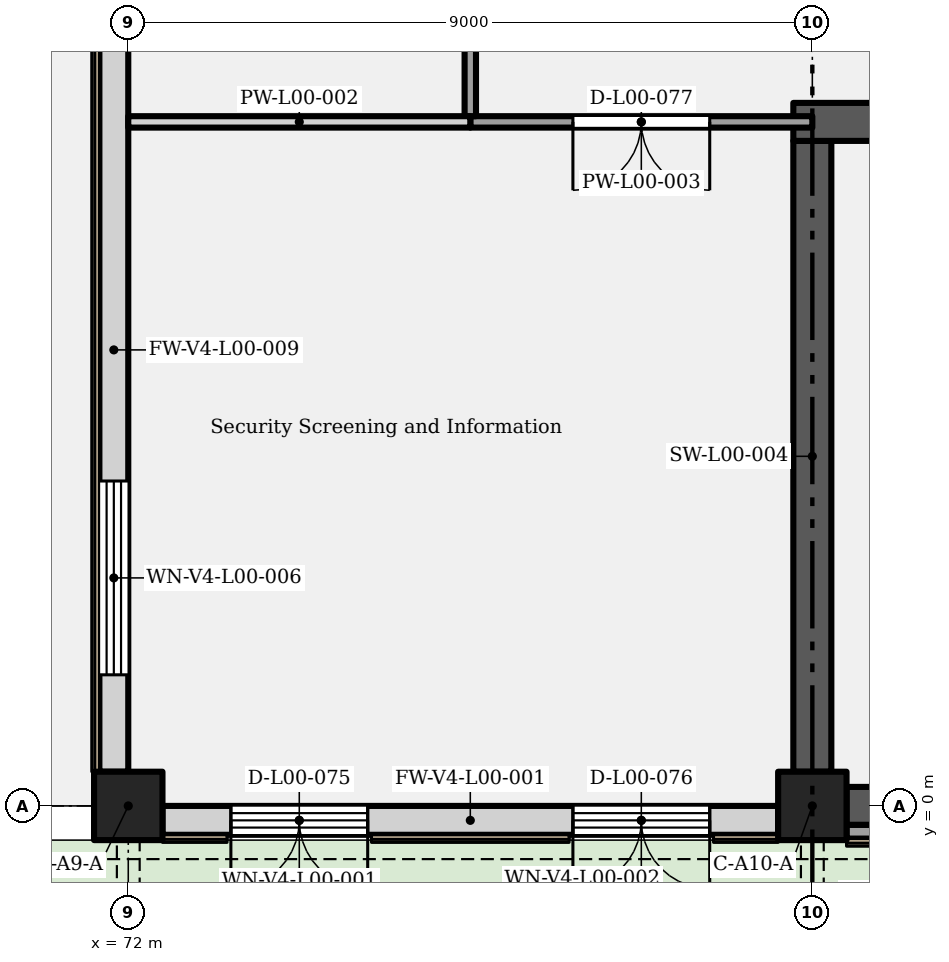
"""IFC4 building model, lengths in metres.
Left out: names, types, materials, properties, quantities, classifications, styles, units other than length and angle.
Written with IfcOpenShell. Run it as: python <this file> out.ifc"""

import sys

from ifc_helpers import new_model, si_unit, direction, frame, frame_2d, origin, origin_2d, place, context, subcontext, project, spatial, rectangle, extrude, element, fill, save


model = new_model("IFC4")
c1 = context("Model", 3, precision=1e-05, world=origin(), true_north=direction((0.0, 1.0)))
c2 = subcontext(c1, "Body", "Model", "MODEL_VIEW")
j1 = project(units=[si_unit("LENGTHUNIT", "METRE"), si_unit("PLANEANGLEUNIT", "RADIAN")], contexts=[c1])
p1 = place(None, origin())
s1 = spatial("IfcSite", under=j1, at=p1, CompositionType="ELEMENT")
p2 = place(p1, origin())
s2 = spatial("IfcBuilding", under=s1, at=p2, CompositionType="ELEMENT")
p3 = place(p2, origin())
s3 = spatial("IfcBuildingStorey", under=s2, at=p3, CompositionType="ELEMENT", Elevation=0.0)
for number, where, z_axis, x_axis in (
    (1, (72.0, 0.0, 0.0), (0.0, 0.0, 1.0), (1.0, 0.0, 0.0)),
    (2, (81.0, 0.0, 0.0), (0.0, 0.0, 1.0), (1.0, 0.0, 0.0)),
):
    element("IfcColumn", number, at=place(p3, frame(where, z_axis=z_axis, x_axis=x_axis)), inside=s3, PredefinedType="COLUMN", context=c2, shape_type="SweptSolid", body=[
        extrude(rectangle(XDim=0.9, YDim=0.9, at=origin_2d()), origin(), (0.0, 0.0, 1.0), 6.6),
    ])
p4 = place(p3, frame((81.45, 0.0, 0.0), z_axis=(0.0, 0.0, 1.0), x_axis=(1.0, 0.0, 0.0)))
e3 = element("IfcWall", 3, at=p4, inside=s3, PredefinedType="SHEAR", context=c2, shape_type="SweptSolid", body=[
    extrude(rectangle(XDim=8.1, YDim=0.5, at=frame_2d((4.05, 0.0))), origin(), (0.0, 0.0, 1.0), 6.3),
])
p5 = place(p4, frame((4.65, 0.0, 0.0), z_axis=(0.0, 0.0, 1.0), x_axis=(-1.0, 0.0, 0.0)))
e4 = element("IfcOpeningElement", 4, at=p5, cuts=e3, PredefinedType="OPENING", context=c2, shape_type="SweptSolid", body=[
    extrude(rectangle(XDim=1.2, YDim=2.1, at=frame_2d((0.6, 1.05))), frame((0.0, 0.26, 0.0), z_axis=(0.0, -1.0, 0.0), x_axis=(1.0, 0.0, 0.0)), (0.0, 0.0, 1.0), 0.52),
])
p6 = place(p3, frame((81.0, 0.45, 0.0), z_axis=(0.0, 0.0, 1.0), x_axis=(0.0, 1.0, 0.0)))
e5 = element("IfcWall", 5, at=p6, inside=s3, PredefinedType="SHEAR", context=c2, shape_type="SweptSolid", body=[
    extrude(rectangle(XDim=8.3, YDim=0.5, at=frame_2d((4.15, 0.0))), origin(), (0.0, 0.0, 1.0), 6.3),
])
p7 = place(p3, frame((80.75, 9.0, 0.0), z_axis=(0.0, 0.0, 1.0), x_axis=(1.0, 0.0, 0.0)))
e6 = element("IfcWall", 6, at=p7, inside=s3, PredefinedType="SHEAR", context=c2, shape_type="SweptSolid", body=[
    extrude(rectangle(XDim=9.5, YDim=0.5, at=frame_2d((4.75, 0.0))), origin(), (0.0, 0.0, 1.0), 6.3),
])
p8 = place(p7, frame((3.1, 0.0, 0.0), z_axis=(0.0, 0.0, 1.0), x_axis=(-1.0, 0.0, 0.0)))
e7 = element("IfcOpeningElement", 7, at=p8, cuts=e6, PredefinedType="OPENING", context=c2, shape_type="SweptSolid", body=[
    extrude(rectangle(XDim=1.2, YDim=2.4, at=frame_2d((0.6, 1.2))), frame((0.0, 0.26, 0.0), z_axis=(0.0, -1.0, 0.0), x_axis=(1.0, 0.0, 0.0)), (0.0, 0.0, 1.0), 0.52),
])
p9 = place(p3, frame((72.45, -0.19, 0.0), z_axis=(0.0, 0.0, 1.0), x_axis=(1.0, 0.0, 0.0)))
e8 = element("IfcWall", 8, at=p9, inside=s3, PredefinedType="SOLIDWALL", context=c2, shape_type="SweptSolid", body=[
    extrude(rectangle(XDim=8.1, YDim=0.38, at=frame_2d((4.05, 0.0))), origin(), (0.0, 0.0, 1.0), 6.3),
])
p10 = place(p9, frame((2.7, 0.0, 0.0), z_axis=(0.0, 0.0, 1.0), x_axis=(-1.0, 0.0, 0.0)))
e9 = element("IfcOpeningElement", 9, at=p10, cuts=e8, PredefinedType="OPENING", context=c2, shape_type="SweptSolid", body=[
    extrude(rectangle(XDim=1.8, YDim=2.1, at=frame_2d((0.9, 1.05))), frame((0.0, 0.2, 0.0), z_axis=(0.0, -1.0, 0.0), x_axis=(1.0, 0.0, 0.0)), (0.0, 0.0, 1.0), 0.4),
])
p11 = place(p9, frame((0.9, 0.0, 2.25)))
e10 = element("IfcOpeningElement", 10, at=p11, cuts=e8, PredefinedType="OPENING", context=c2, shape_type="SweptSolid", body=[
    extrude(rectangle(XDim=1.8, YDim=0.8, at=frame_2d((0.9, 0.4))), frame((0.0, 0.2, 0.0), z_axis=(0.0, -1.0, 0.0), x_axis=(1.0, 0.0, 0.0)), (0.0, 0.0, 1.0), 0.4),
])
p12 = place(p9, frame((7.2, 0.0, 0.0), z_axis=(0.0, 0.0, 1.0), x_axis=(-1.0, 0.0, 0.0)))
e11 = element("IfcOpeningElement", 11, at=p12, cuts=e8, PredefinedType="OPENING", context=c2, shape_type="SweptSolid", body=[
    extrude(rectangle(XDim=1.8, YDim=2.1, at=frame_2d((0.9, 1.05))), frame((0.0, 0.2, 0.0), z_axis=(0.0, -1.0, 0.0), x_axis=(1.0, 0.0, 0.0)), (0.0, 0.0, 1.0), 0.4),
])
p13 = place(p9, frame((5.4, 0.0, 2.25)))
e12 = element("IfcOpeningElement", 12, at=p13, cuts=e8, PredefinedType="OPENING", context=c2, shape_type="SweptSolid", body=[
    extrude(rectangle(XDim=1.8, YDim=0.8, at=frame_2d((0.9, 0.4))), frame((0.0, 0.2, 0.0), z_axis=(0.0, -1.0, 0.0), x_axis=(1.0, 0.0, 0.0)), (0.0, 0.0, 1.0), 0.4),
])
p14 = place(p3, frame((81.45, -0.34, 0.0), z_axis=(0.0, 0.0, 1.0), x_axis=(1.0, 0.0, 0.0)))
e13 = element("IfcWall", 13, at=p14, inside=s3, PredefinedType="SOLIDWALL", context=c2, shape_type="SweptSolid", body=[
    extrude(rectangle(XDim=3.45, YDim=0.18, at=frame_2d((1.725, 0.0))), origin(), (0.0, 0.0, 1.0), 6.3),
])
p15 = place(p3, frame((71.81, 0.45, 0.0), z_axis=(0.0, 0.0, 1.0), x_axis=(0.0, 1.0, 0.0)))
e14 = element("IfcWall", 14, at=p15, inside=s3, PredefinedType="SOLIDWALL", context=c2, shape_type="SweptSolid", body=[
    extrude(rectangle(XDim=11.1, YDim=0.38, at=frame_2d((5.55, 0.0))), origin(), (0.0, 0.0, 1.0), 6.3),
])
p16 = place(p15, frame((1.275, 0.0, 0.9)))
e15 = element("IfcOpeningElement", 15, at=p16, cuts=e14, PredefinedType="OPENING", context=c2, shape_type="SweptSolid", body=[
    extrude(rectangle(XDim=2.55, YDim=2.55, at=frame_2d((1.275, 1.275))), frame((0.0, 0.2, 0.0), z_axis=(0.0, -1.0, 0.0), x_axis=(1.0, 0.0, 0.0)), (0.0, 0.0, 1.0), 0.4),
])
p17 = place(p3, frame((72.0, 9.0, 0.0), z_axis=(0.0, 0.0, 1.0), x_axis=(1.0, 0.0, 0.0)))
e16 = element("IfcWall", 16, at=p17, inside=s3, PredefinedType="PARTITIONING", context=c2, shape_type="SweptSolid", body=[
    extrude(rectangle(XDim=4.5, YDim=0.15, at=frame_2d((2.25, 0.0))), origin(), (0.0, 0.0, 1.0), 6.3),
])
p18 = place(p3, frame((76.5, 9.0, 0.0), z_axis=(0.0, 0.0, 1.0), x_axis=(1.0, 0.0, 0.0)))
e17 = element("IfcWall", 17, at=p18, inside=s3, PredefinedType="PARTITIONING", context=c2, shape_type="SweptSolid", body=[
    extrude(rectangle(XDim=4.5, YDim=0.15, at=frame_2d((2.25, 0.0))), origin(), (0.0, 0.0, 1.0), 6.3),
])
p19 = place(p18, frame((3.15, 0.0, 0.0), z_axis=(0.0, 0.0, 1.0), x_axis=(-1.0, 0.0, 0.0)))
e18 = element("IfcOpeningElement", 18, at=p19, cuts=e17, PredefinedType="OPENING", context=c2, shape_type="SweptSolid", body=[
    extrude(rectangle(XDim=1.8, YDim=2.4, at=frame_2d((0.9, 1.2))), frame((0.0, 0.085, 0.0), z_axis=(0.0, -1.0, 0.0), x_axis=(1.0, 0.0, 0.0)), (0.0, 0.0, 1.0), 0.17),
])
p20 = place(p3, frame((76.5, 9.075, 0.0), z_axis=(0.0, 0.0, 1.0), x_axis=(0.0, 1.0, 0.0)))
e19 = element("IfcWall", 19, at=p20, inside=s3, PredefinedType="PARTITIONING", context=c2, shape_type="SweptSolid", body=[
    extrude(rectangle(XDim=10.425, YDim=0.15, at=frame_2d((5.212, 0.0))), origin(), (0.0, 0.0, 1.0), 6.3),
])
p21 = place(p20, frame((4.275, 0.0, 0.0)))
e20 = element("IfcOpeningElement", 20, at=p21, cuts=e19, PredefinedType="OPENING", context=c2, shape_type="SweptSolid", body=[
    extrude(rectangle(XDim=1.8, YDim=2.4, at=frame_2d((0.9, 1.2))), frame((0.0, 0.085, 0.0), z_axis=(0.0, -1.0, 0.0), x_axis=(1.0, 0.0, 0.0)), (0.0, 0.0, 1.0), 0.17),
])
p22 = place(p10, origin())
e21 = element("IfcDoor", 21, at=p22, inside=s3, OperationType="DOUBLE_DOOR_SINGLE_SWING", PredefinedType="DOOR", context=c2, shape_type="SweptSolid", body=[
    extrude(rectangle(XDim=1.8, YDim=2.1, at=frame_2d((0.9, 1.05))), frame((0.0, 0.025, 0.0), z_axis=(0.0, -1.0, 0.0), x_axis=(1.0, 0.0, 0.0)), (0.0, 0.0, 1.0), 0.05),
])
fill(e9, e21)
p23 = place(p11, origin())
e22 = element("IfcWindow", 22, at=p23, inside=s3, PartitioningType="SINGLE_PANEL", PredefinedType="WINDOW", context=c2, shape_type="SweptSolid", body=[
    extrude(rectangle(XDim=1.8, YDim=0.8, at=frame_2d((0.9, 0.4))), frame((0.0, 0.03, 0.0), z_axis=(0.0, -1.0, 0.0), x_axis=(1.0, 0.0, 0.0)), (0.0, 0.0, 1.0), 0.06),
])
fill(e10, e22)
p24 = place(p12, origin())
e23 = element("IfcDoor", 23, at=p24, inside=s3, OperationType="DOUBLE_DOOR_SINGLE_SWING", PredefinedType="DOOR", context=c2, shape_type="SweptSolid", body=[
    extrude(rectangle(XDim=1.8, YDim=2.1, at=frame_2d((0.9, 1.05))), frame((0.0, 0.025, 0.0), z_axis=(0.0, -1.0, 0.0), x_axis=(1.0, 0.0, 0.0)), (0.0, 0.0, 1.0), 0.05),
])
fill(e11, e23)
p25 = place(p13, origin())
e24 = element("IfcWindow", 24, at=p25, inside=s3, PartitioningType="SINGLE_PANEL", PredefinedType="WINDOW", context=c2, shape_type="SweptSolid", body=[
    extrude(rectangle(XDim=1.8, YDim=0.8, at=frame_2d((0.9, 0.4))), frame((0.0, 0.03, 0.0), z_axis=(0.0, -1.0, 0.0), x_axis=(1.0, 0.0, 0.0)), (0.0, 0.0, 1.0), 0.06),
])
fill(e12, e24)
p26 = place(p16, origin())
e25 = element("IfcWindow", 25, at=p26, inside=s3, PartitioningType="SINGLE_PANEL", PredefinedType="WINDOW", context=c2, shape_type="SweptSolid", body=[
    extrude(rectangle(XDim=2.55, YDim=2.55, at=frame_2d((1.275, 1.275))), frame((0.0, 0.03, 0.0), z_axis=(0.0, -1.0, 0.0), x_axis=(1.0, 0.0, 0.0)), (0.0, 0.0, 1.0), 0.06),
])
fill(e15, e25)
p27 = place(p19, origin())
e26 = element("IfcDoor", 26, at=p27, inside=s3, OperationType="DOUBLE_DOOR_SINGLE_SWING", PredefinedType="DOOR", context=c2, shape_type="SweptSolid", body=[
    extrude(rectangle(XDim=1.8, YDim=2.4, at=frame_2d((0.9, 1.2))), frame((0.0, 0.025, 0.0), z_axis=(0.0, -1.0, 0.0), x_axis=(1.0, 0.0, 0.0)), (0.0, 0.0, 1.0), 0.05),
])
fill(e18, e26)
save(model, sys.argv[1])
